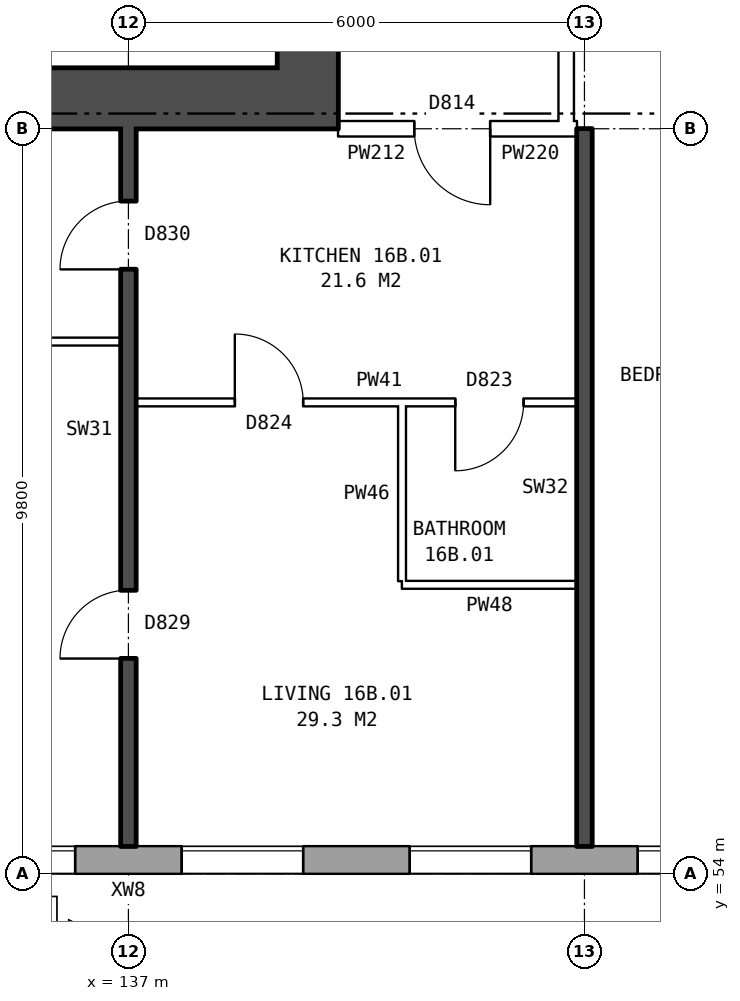
"""IFC4 building model, lengths in metres.
Left out: names, types, materials, properties, quantities, classifications, styles, units other than length and angle.
Written with IfcOpenShell. Run it as: python <this file> out.ifc"""

import sys

from ifc_helpers import new_model, si_unit, direction, frame, frame_2d, origin, place, context, subcontext, project, spatial, rectangle, extrude, element, fill, save


model = new_model("IFC4")
c1 = context("Model", 3, precision=1e-05, world=origin(), true_north=direction((0.0, 1.0)))
c2 = subcontext(c1, "Body", "Model", "MODEL_VIEW")
j1 = project(units=[si_unit("LENGTHUNIT", "METRE"), si_unit("PLANEANGLEUNIT", "RADIAN")], contexts=[c1])
p1 = place(None, origin())
s1 = spatial("IfcSite", under=j1, at=p1, CompositionType="ELEMENT")
p2 = place(p1, origin())
s2 = spatial("IfcBuilding", under=s1, at=p2, CompositionType="ELEMENT")
p3 = place(p2, frame((0.0, 0.0, 59.8)))
s3 = spatial("IfcBuildingStorey", under=s2, at=p3, CompositionType="ELEMENT", Elevation=59.8)
p4 = place(p3, frame((134.075, 54.18, 0.0), z_axis=(0.0, 0.0, 1.0), x_axis=(1.0, 0.0, 0.0)))
e1 = element("IfcWall", 1, at=p4, inside=s3, PredefinedType="STANDARD", context=c2, shape_type="SweptSolid", body=[
    extrude(rectangle(XDim=39.351, YDim=0.36, at=frame_2d((19.675, 0.0))), origin(), (0.0, 0.0, 1.0), 2.85),
])
p5 = place(p4, frame((0.625, 0.0, 0.8)))
e2 = element("IfcOpeningElement", 2, at=p5, cuts=e1, PredefinedType="OPENING", context=c2, shape_type="SweptSolid", body=[
    extrude(rectangle(XDim=1.6, YDim=1.8, at=frame_2d((0.8, 0.9))), frame((0.0, 0.19, 0.0), z_axis=(0.0, -1.0, 0.0), x_axis=(1.0, 0.0, 0.0)), (0.0, 0.0, 1.0), 0.38),
])
p6 = place(p4, frame((3.625, 0.0, 0.8)))
e3 = element("IfcOpeningElement", 3, at=p6, cuts=e1, PredefinedType="OPENING", context=c2, shape_type="SweptSolid", body=[
    extrude(rectangle(XDim=1.6, YDim=1.8, at=frame_2d((0.8, 0.9))), frame((0.0, 0.19, 0.0), z_axis=(0.0, -1.0, 0.0), x_axis=(1.0, 0.0, 0.0)), (0.0, 0.0, 1.0), 0.38),
])
p7 = place(p4, frame((6.625, 0.0, 0.8)))
e4 = element("IfcOpeningElement", 4, at=p7, cuts=e1, PredefinedType="OPENING", context=c2, shape_type="SweptSolid", body=[
    extrude(rectangle(XDim=1.6, YDim=1.8, at=frame_2d((0.8, 0.9))), frame((0.0, 0.19, 0.0), z_axis=(0.0, -1.0, 0.0), x_axis=(1.0, 0.0, 0.0)), (0.0, 0.0, 1.0), 0.38),
])
p8 = place(p4, frame((9.625, 0.0, 0.8)))
e5 = element("IfcOpeningElement", 5, at=p8, cuts=e1, PredefinedType="OPENING", context=c2, shape_type="SweptSolid", body=[
    extrude(rectangle(XDim=1.6, YDim=1.8, at=frame_2d((0.8, 0.9))), frame((0.0, 0.19, 0.0), z_axis=(0.0, -1.0, 0.0), x_axis=(1.0, 0.0, 0.0)), (0.0, 0.0, 1.0), 0.38),
])
p9 = place(p4, frame((12.625, 0.0, 0.8)))
e6 = element("IfcOpeningElement", 6, at=p9, cuts=e1, PredefinedType="OPENING", context=c2, shape_type="SweptSolid", body=[
    extrude(rectangle(XDim=1.6, YDim=1.8, at=frame_2d((0.8, 0.9))), frame((0.0, 0.19, 0.0), z_axis=(0.0, -1.0, 0.0), x_axis=(1.0, 0.0, 0.0)), (0.0, 0.0, 1.0), 0.38),
])
p10 = place(p4, frame((15.125, 0.0, 0.8)))
e7 = element("IfcOpeningElement", 7, at=p10, cuts=e1, PredefinedType="OPENING", context=c2, shape_type="SweptSolid", body=[
    extrude(rectangle(XDim=1.6, YDim=1.8, at=frame_2d((0.8, 0.9))), frame((0.0, 0.19, 0.0), z_axis=(0.0, -1.0, 0.0), x_axis=(1.0, 0.0, 0.0)), (0.0, 0.0, 1.0), 0.38),
])
p11 = place(p4, frame((18.275, 0.0, 0.15)))
e8 = element("IfcOpeningElement", 8, at=p11, cuts=e1, PredefinedType="OPENING", context=c2, shape_type="SweptSolid", body=[
    extrude(rectangle(XDim=0.6, YDim=0.9, at=frame_2d((0.3, 0.45))), frame((0.0, 0.19, 0.0), z_axis=(0.0, -1.0, 0.0), x_axis=(1.0, 0.0, 0.0)), (0.0, 0.0, 1.0), 0.38),
])
p12 = place(p4, frame((21.525, 0.0, 1.7)))
e9 = element("IfcOpeningElement", 9, at=p12, cuts=e1, PredefinedType="OPENING", context=c2, shape_type="SweptSolid", body=[
    extrude(rectangle(XDim=0.6, YDim=0.9, at=frame_2d((0.3, 0.45))), frame((0.0, 0.19, 0.0), z_axis=(0.0, -1.0, 0.0), x_axis=(1.0, 0.0, 0.0)), (0.0, 0.0, 1.0), 0.38),
])
p13 = place(p4, frame((24.625, 0.0, 0.8)))
e10 = element("IfcOpeningElement", 10, at=p13, cuts=e1, PredefinedType="OPENING", context=c2, shape_type="SweptSolid", body=[
    extrude(rectangle(XDim=1.6, YDim=1.8, at=frame_2d((0.8, 0.9))), frame((0.0, 0.19, 0.0), z_axis=(0.0, -1.0, 0.0), x_axis=(1.0, 0.0, 0.0)), (0.0, 0.0, 1.0), 0.38),
])
p14 = place(p4, frame((27.625, 0.0, 0.8)))
e11 = element("IfcOpeningElement", 11, at=p14, cuts=e1, PredefinedType="OPENING", context=c2, shape_type="SweptSolid", body=[
    extrude(rectangle(XDim=1.6, YDim=1.8, at=frame_2d((0.8, 0.9))), frame((0.0, 0.19, 0.0), z_axis=(0.0, -1.0, 0.0), x_axis=(1.0, 0.0, 0.0)), (0.0, 0.0, 1.0), 0.38),
])
p15 = place(p4, frame((30.625, 0.0, 0.8)))
e12 = element("IfcOpeningElement", 12, at=p15, cuts=e1, PredefinedType="OPENING", context=c2, shape_type="SweptSolid", body=[
    extrude(rectangle(XDim=1.6, YDim=1.8, at=frame_2d((0.8, 0.9))), frame((0.0, 0.19, 0.0), z_axis=(0.0, -1.0, 0.0), x_axis=(1.0, 0.0, 0.0)), (0.0, 0.0, 1.0), 0.38),
])
p16 = place(p4, frame((33.625, 0.0, 0.8)))
e13 = element("IfcOpeningElement", 13, at=p16, cuts=e1, PredefinedType="OPENING", context=c2, shape_type="SweptSolid", body=[
    extrude(rectangle(XDim=1.6, YDim=1.8, at=frame_2d((0.8, 0.9))), frame((0.0, 0.19, 0.0), z_axis=(0.0, -1.0, 0.0), x_axis=(1.0, 0.0, 0.0)), (0.0, 0.0, 1.0), 0.38),
])
p17 = place(p4, frame((36.625, 0.0, 0.8)))
e14 = element("IfcOpeningElement", 14, at=p17, cuts=e1, PredefinedType="OPENING", context=c2, shape_type="SweptSolid", body=[
    extrude(rectangle(XDim=1.6, YDim=1.8, at=frame_2d((0.8, 0.9))), frame((0.0, 0.19, 0.0), z_axis=(0.0, -1.0, 0.0), x_axis=(1.0, 0.0, 0.0)), (0.0, 0.0, 1.0), 0.38),
])
p18 = place(p4, frame((17.025, 0.0, 1.6)))
e15 = element("IfcOpeningElement", 15, at=p18, cuts=e1, PredefinedType="OPENING", context=c2, shape_type="SweptSolid", body=[
    extrude(rectangle(XDim=0.6, YDim=0.9, at=frame_2d((0.3, 0.45))), frame((0.0, 0.19, 0.0), z_axis=(0.0, -1.0, 0.0), x_axis=(1.0, 0.0, 0.0)), (0.0, 0.0, 1.0), 0.38),
])
p19 = place(p4, frame((19.175, 0.0, 0.25)))
e16 = element("IfcOpeningElement", 16, at=p19, cuts=e1, PredefinedType="OPENING", context=c2, shape_type="SweptSolid", body=[
    extrude(rectangle(XDim=1.4, YDim=1.2, at=frame_2d((0.7, 0.6))), frame((0.0, 0.19, 0.0), z_axis=(0.0, -1.0, 0.0), x_axis=(1.0, 0.0, 0.0)), (0.0, 0.0, 1.0), 0.38),
])
p20 = place(p4, frame((22.425, 0.0, 1.0)))
e17 = element("IfcOpeningElement", 17, at=p20, cuts=e1, PredefinedType="OPENING", context=c2, shape_type="SweptSolid", body=[
    extrude(rectangle(XDim=0.6, YDim=1.5, at=frame_2d((0.3, 0.75))), frame((0.0, 0.19, 0.0), z_axis=(0.0, -1.0, 0.0), x_axis=(1.0, 0.0, 0.0)), (0.0, 0.0, 1.0), 0.38),
])
p21 = place(p4, frame((23.325, 0.0, 0.8)))
e18 = element("IfcOpeningElement", 18, at=p21, cuts=e1, PredefinedType="OPENING", context=c2, shape_type="SweptSolid", body=[
    extrude(rectangle(XDim=1.0, YDim=1.8, at=frame_2d((0.5, 0.9))), frame((0.0, 0.19, 0.0), z_axis=(0.0, -1.0, 0.0), x_axis=(1.0, 0.0, 0.0)), (0.0, 0.0, 1.0), 0.38),
])
p22 = place(p3, frame((139.36, 64.6, 0.0), z_axis=(0.0, 0.0, 1.0), x_axis=(0.0, 1.0, 0.0)))
e19 = element("IfcWall", 19, at=p22, inside=s3, PredefinedType="SHEAR", context=c2, shape_type="SweptSolid", body=[
    extrude(rectangle(XDim=10.8, YDim=0.8, at=frame_2d((5.4, 0.0))), origin(), (0.0, 0.0, 1.0), 2.85),
])
p23 = place(p22, frame((0.525, 0.0, 0.0)))
e20 = element("IfcOpeningElement", 20, at=p23, cuts=e19, PredefinedType="OPENING", context=c2, shape_type="SweptSolid", body=[
    extrude(rectangle(XDim=1.1, YDim=2.1, at=frame_2d((0.55, 1.05))), frame((0.0, 0.41, 0.0), z_axis=(0.0, -1.0, 0.0), x_axis=(1.0, 0.0, 0.0)), (0.0, 0.0, 1.0), 0.82),
])
p24 = place(p22, frame((9.1, 0.0, 0.0)))
e21 = element("IfcOpeningElement", 21, at=p24, cuts=e19, PredefinedType="OPENING", context=c2, shape_type="SweptSolid", body=[
    extrude(rectangle(XDim=1.1, YDim=2.1, at=frame_2d((0.55, 1.05))), frame((0.0, 0.41, 0.0), z_axis=(0.0, -1.0, 0.0), x_axis=(1.0, 0.0, 0.0)), (0.0, 0.0, 1.0), 0.82),
])
p25 = place(p22, frame((7.325, 0.0, 0.0)))
e22 = element("IfcOpeningElement", 22, at=p25, cuts=e19, PredefinedType="OPENING", context=c2, shape_type="SweptSolid", body=[
    extrude(rectangle(XDim=0.85, YDim=2.1, at=frame_2d((0.425, 1.05))), frame((0.0, 0.41, 0.0), z_axis=(0.0, -1.0, 0.0), x_axis=(1.0, 0.0, 0.0)), (0.0, 0.0, 1.0), 0.82),
])
p26 = place(p3, frame((139.76, 64.2, 0.0), z_axis=(0.0, 0.0, 1.0), x_axis=(-1.0, 0.0, 0.0)))
e23 = element("IfcWall", 23, at=p26, inside=s3, PredefinedType="SHEAR", context=c2, shape_type="SweptSolid", body=[
    extrude(rectangle(XDim=8.4, YDim=0.8, at=frame_2d((4.2, 0.0))), origin(), (0.0, 0.0, 1.0), 2.85),
])
p27 = place(p3, frame((142.76, 63.9, 0.0), z_axis=(0.0, 0.0, 1.0), x_axis=(0.0, 1.0, 0.0)))
e24 = element("IfcWall", 24, at=p27, inside=s3, PredefinedType="PARTITIONING", context=c2, shape_type="SweptSolid", body=[
    extrude(rectangle(XDim=12.2, YDim=0.2, at=frame_2d((6.1, 0.0))), origin(), (0.0, 0.0, 1.0), 2.85),
])
p28 = place(p27, frame((5.1, 0.0, 0.0)))
e25 = element("IfcOpeningElement", 25, at=p28, cuts=e24, PredefinedType="OPENING", context=c2, shape_type="SweptSolid", body=[
    extrude(rectangle(XDim=2.0, YDim=2.1, at=frame_2d((1.0, 1.05))), frame((0.0, 0.11, 0.0), z_axis=(0.0, -1.0, 0.0), x_axis=(1.0, 0.0, 0.0)), (0.0, 0.0, 1.0), 0.22),
])
p29 = place(p3, frame((140.6, 57.8, 0.0), z_axis=(0.0, 0.0, 1.0), x_axis=(1.0, 0.0, 0.0)))
e26 = element("IfcWall", 26, at=p29, inside=s3, PredefinedType="PARTITIONING", context=c2, shape_type="SweptSolid", body=[
    extrude(rectangle(XDim=2.3, YDim=0.1, at=frame_2d((1.15, 0.0))), origin(), (0.0, 0.0, 1.0), 2.85),
])
p30 = place(p3, frame((137.1, 60.2, 0.0), z_axis=(0.0, 0.0, 1.0), x_axis=(1.0, 0.0, 0.0)))
e27 = element("IfcWall", 27, at=p30, inside=s3, PredefinedType="PARTITIONING", context=c2, shape_type="SweptSolid", body=[
    extrude(rectangle(XDim=5.8, YDim=0.1, at=frame_2d((2.9, 0.0))), origin(), (0.0, 0.0, 1.0), 2.85),
])
p31 = place(p30, frame((1.3, 0.0, 0.0)))
e28 = element("IfcOpeningElement", 28, at=p31, cuts=e27, PredefinedType="OPENING", context=c2, shape_type="SweptSolid", body=[
    extrude(rectangle(XDim=0.9, YDim=2.1, at=frame_2d((0.45, 1.05))), frame((0.0, 0.06, 0.0), z_axis=(0.0, -1.0, 0.0), x_axis=(1.0, 0.0, 0.0)), (0.0, 0.0, 1.0), 0.12),
])
p32 = place(p30, frame((4.2, 0.0, 0.0)))
e29 = element("IfcOpeningElement", 29, at=p32, cuts=e27, PredefinedType="OPENING", context=c2, shape_type="SweptSolid", body=[
    extrude(rectangle(XDim=0.9, YDim=2.1, at=frame_2d((0.45, 1.05))), frame((0.0, 0.06, 0.0), z_axis=(0.0, -1.0, 0.0), x_axis=(1.0, 0.0, 0.0)), (0.0, 0.0, 1.0), 0.12),
])
p33 = place(p3, frame((131.36, 61.0, 0.0), z_axis=(0.0, 0.0, 1.0), x_axis=(1.0, 0.0, 0.0)))
e30 = element("IfcWall", 30, at=p33, inside=s3, PredefinedType="PARTITIONING", context=c2, shape_type="SweptSolid", body=[
    extrude(rectangle(XDim=5.54, YDim=0.1, at=frame_2d((2.77, 0.0))), origin(), (0.0, 0.0, 1.0), 2.85),
])
p34 = place(p3, frame((139.76, 63.8, 0.0), z_axis=(0.0, 0.0, 1.0), x_axis=(1.0, 0.0, 0.0)))
e31 = element("IfcWall", 31, at=p34, inside=s3, PredefinedType="PARTITIONING", context=c2, shape_type="SweptSolid", body=[
    extrude(rectangle(XDim=3.0, YDim=0.2, at=frame_2d((1.5, 0.0))), origin(), (0.0, 0.0, 1.0), 2.85),
])
p35 = place(p34, frame((1.0, 0.0, 0.0)))
e32 = element("IfcOpeningElement", 32, at=p35, cuts=e31, PredefinedType="OPENING", context=c2, shape_type="SweptSolid", body=[
    extrude(rectangle(XDim=1.0, YDim=2.1, at=frame_2d((0.5, 1.05))), frame((0.0, 0.11, 0.0), z_axis=(0.0, -1.0, 0.0), x_axis=(1.0, 0.0, 0.0)), (0.0, 0.0, 1.0), 0.22),
])
p36 = place(p3, frame((142.76, 63.8, 0.0), z_axis=(0.0, 0.0, 1.0), x_axis=(1.0, 0.0, 0.0)))
e33 = element("IfcWall", 33, at=p36, inside=s3, PredefinedType="PARTITIONING", context=c2, shape_type="SweptSolid", body=[
    extrude(rectangle(XDim=0.14, YDim=0.2, at=frame_2d((0.07, 0.0))), origin(), (0.0, 0.0, 1.0), 2.85),
])
p37 = place(p3, frame((137.0, 54.36, 0.0), z_axis=(0.0, 0.0, 1.0), x_axis=(0.0, 1.0, 0.0)))
e34 = element("IfcWall", 34, at=p37, inside=s3, PredefinedType="SOLIDWALL", context=c2, shape_type="SweptSolid", body=[
    extrude(rectangle(XDim=9.44, YDim=0.2, at=frame_2d((4.72, 0.0))), origin(), (0.0, 0.0, 1.0), 2.85),
])
p38 = place(p37, frame((2.47, 0.0, 0.0)))
e35 = element("IfcOpeningElement", 35, at=p38, cuts=e34, PredefinedType="OPENING", context=c2, shape_type="SweptSolid", body=[
    extrude(rectangle(XDim=0.9, YDim=2.1, at=frame_2d((0.45, 1.05))), frame((0.0, 0.11, 0.0), z_axis=(0.0, -1.0, 0.0), x_axis=(1.0, 0.0, 0.0)), (0.0, 0.0, 1.0), 0.22),
])
p39 = place(p37, frame((7.59, 0.0, 0.0)))
e36 = element("IfcOpeningElement", 36, at=p39, cuts=e34, PredefinedType="OPENING", context=c2, shape_type="SweptSolid", body=[
    extrude(rectangle(XDim=0.9, YDim=2.1, at=frame_2d((0.45, 1.05))), frame((0.0, 0.11, 0.0), z_axis=(0.0, -1.0, 0.0), x_axis=(1.0, 0.0, 0.0)), (0.0, 0.0, 1.0), 0.22),
])
p40 = place(p3, frame((140.6, 57.85, 0.0), z_axis=(0.0, 0.0, 1.0), x_axis=(0.0, 1.0, 0.0)))
e37 = element("IfcWall", 37, at=p40, inside=s3, PredefinedType="PARTITIONING", context=c2, shape_type="SweptSolid", body=[
    extrude(rectangle(XDim=2.3, YDim=0.1, at=frame_2d((1.15, 0.0))), origin(), (0.0, 0.0, 1.0), 2.85),
])
p41 = place(p3, frame((143.0, 54.36, 0.0), z_axis=(0.0, 0.0, 1.0), x_axis=(0.0, 1.0, 0.0)))
e38 = element("IfcWall", 38, at=p41, inside=s3, PredefinedType="SOLIDWALL", context=c2, shape_type="SweptSolid", body=[
    extrude(rectangle(XDim=9.44, YDim=0.2, at=frame_2d((4.72, 0.0))), origin(), (0.0, 0.0, 1.0), 2.85),
])
p42 = place(p5, origin())
e39 = element("IfcWindow", 39, at=p42, inside=s3, PartitioningType="SINGLE_PANEL", PredefinedType="WINDOW", context=c2, shape_type="SweptSolid", body=[
    extrude(rectangle(XDim=1.6, YDim=1.8, at=frame_2d((0.8, 0.9))), frame((0.0, 0.15, 0.0), z_axis=(0.0, -1.0, 0.0), x_axis=(1.0, 0.0, 0.0)), (0.0, 0.0, 1.0), 0.06),
])
fill(e2, e39)
p43 = place(p6, origin())
e40 = element("IfcWindow", 40, at=p43, inside=s3, PartitioningType="SINGLE_PANEL", PredefinedType="WINDOW", context=c2, shape_type="SweptSolid", body=[
    extrude(rectangle(XDim=1.6, YDim=1.8, at=frame_2d((0.8, 0.9))), frame((0.0, 0.15, 0.0), z_axis=(0.0, -1.0, 0.0), x_axis=(1.0, 0.0, 0.0)), (0.0, 0.0, 1.0), 0.06),
])
fill(e3, e40)
p44 = place(p7, origin())
e41 = element("IfcWindow", 41, at=p44, inside=s3, PartitioningType="SINGLE_PANEL", PredefinedType="WINDOW", context=c2, shape_type="SweptSolid", body=[
    extrude(rectangle(XDim=1.6, YDim=1.8, at=frame_2d((0.8, 0.9))), frame((0.0, 0.15, 0.0), z_axis=(0.0, -1.0, 0.0), x_axis=(1.0, 0.0, 0.0)), (0.0, 0.0, 1.0), 0.06),
])
fill(e4, e41)
p45 = place(p8, origin())
e42 = element("IfcWindow", 42, at=p45, inside=s3, PartitioningType="SINGLE_PANEL", PredefinedType="WINDOW", context=c2, shape_type="SweptSolid", body=[
    extrude(rectangle(XDim=1.6, YDim=1.8, at=frame_2d((0.8, 0.9))), frame((0.0, 0.15, 0.0), z_axis=(0.0, -1.0, 0.0), x_axis=(1.0, 0.0, 0.0)), (0.0, 0.0, 1.0), 0.06),
])
fill(e5, e42)
p46 = place(p38, origin())
e43 = element("IfcDoor", 43, at=p46, inside=s3, OperationType="SINGLE_SWING_LEFT", PredefinedType="DOOR", context=c2, shape_type="SweptSolid", body=[
    extrude(rectangle(XDim=0.9, YDim=2.1, at=frame_2d((0.45, 1.05))), frame((0.0, 0.025, 0.0), z_axis=(0.0, -1.0, 0.0), x_axis=(1.0, 0.0, 0.0)), (0.0, 0.0, 1.0), 0.05),
])
fill(e35, e43)
p47 = place(p39, origin())
e44 = element("IfcDoor", 44, at=p47, inside=s3, OperationType="SINGLE_SWING_LEFT", PredefinedType="DOOR", context=c2, shape_type="SweptSolid", body=[
    extrude(rectangle(XDim=0.9, YDim=2.1, at=frame_2d((0.45, 1.05))), frame((0.0, 0.025, 0.0), z_axis=(0.0, -1.0, 0.0), x_axis=(1.0, 0.0, 0.0)), (0.0, 0.0, 1.0), 0.05),
])
fill(e36, e44)
p48 = place(p35, frame((1.0, 0.0, 0.0), z_axis=(0.0, 0.0, 1.0), x_axis=(-1.0, 0.0, 0.0)))
e45 = element("IfcDoor", 45, at=p48, inside=s3, OperationType="SINGLE_SWING_LEFT", PredefinedType="DOOR", context=c2, shape_type="SweptSolid", body=[
    extrude(rectangle(XDim=1.0, YDim=2.1, at=frame_2d((0.5, 1.05))), frame((0.0, 0.025, 0.0), z_axis=(0.0, -1.0, 0.0), x_axis=(1.0, 0.0, 0.0)), (0.0, 0.0, 1.0), 0.05),
])
fill(e32, e45)
p49 = place(p31, origin())
e46 = element("IfcDoor", 46, at=p49, inside=s3, OperationType="SINGLE_SWING_LEFT", PredefinedType="DOOR", context=c2, shape_type="SweptSolid", body=[
    extrude(rectangle(XDim=0.9, YDim=2.1, at=frame_2d((0.45, 1.05))), frame((0.0, 0.025, 0.0), z_axis=(0.0, -1.0, 0.0), x_axis=(1.0, 0.0, 0.0)), (0.0, 0.0, 1.0), 0.05),
])
fill(e28, e46)
p50 = place(p32, frame((0.9, 0.0, 0.0), z_axis=(0.0, 0.0, 1.0), x_axis=(-1.0, 0.0, 0.0)))
e47 = element("IfcDoor", 47, at=p50, inside=s3, OperationType="SINGLE_SWING_RIGHT", PredefinedType="DOOR", context=c2, shape_type="SweptSolid", body=[
    extrude(rectangle(XDim=0.9, YDim=2.1, at=frame_2d((0.45, 1.05))), frame((0.0, 0.025, 0.0), z_axis=(0.0, -1.0, 0.0), x_axis=(1.0, 0.0, 0.0)), (0.0, 0.0, 1.0), 0.05),
])
fill(e29, e47)
save(model, sys.argv[1])
